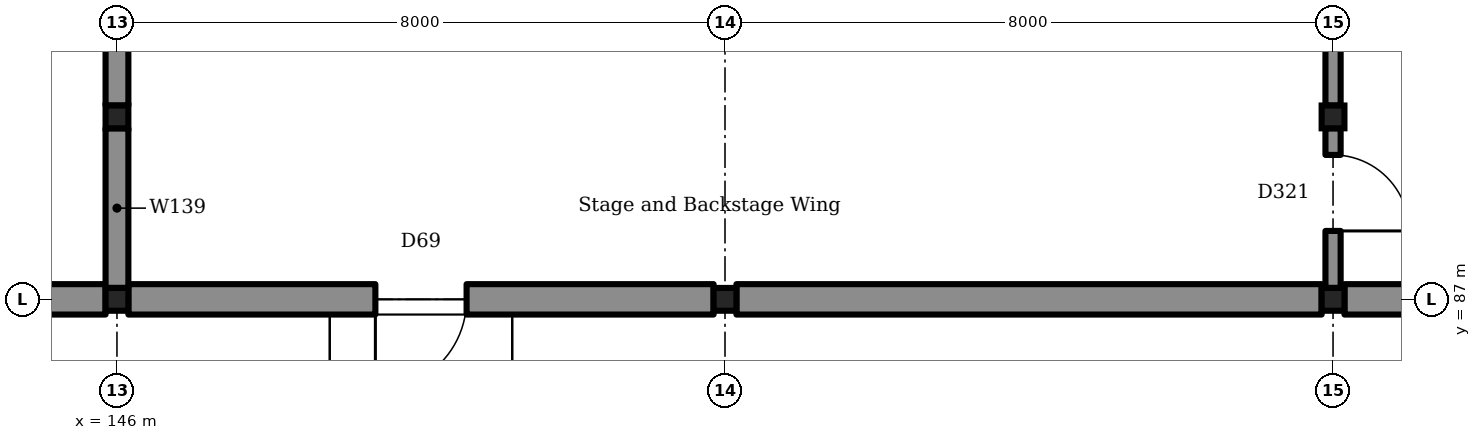
"""IFC4 building model, lengths in metres.
Left out: names, types, materials, properties, quantities, classifications, styles, units other than length and angle.
Written with IfcOpenShell. Run it as: python <this file> out.ifc"""

import sys

from ifc_helpers import new_model, si_unit, direction, frame, frame_2d, origin, origin_2d, place, context, subcontext, project, spatial, rectangle, i_section, extrude, element, fill, save


model = new_model("IFC4")
c1 = context("Model", 3, precision=1e-05, world=origin(), true_north=direction((0.0, 1.0)))
c2 = subcontext(c1, "Body", "Model", "MODEL_VIEW")
j1 = project(units=[si_unit("LENGTHUNIT", "METRE"), si_unit("PLANEANGLEUNIT", "RADIAN")], contexts=[c1])
p1 = place(None, origin())
s1 = spatial("IfcSite", under=j1, at=p1, CompositionType="ELEMENT")
p2 = place(p1, origin())
s2 = spatial("IfcBuilding", under=s1, at=p2, CompositionType="ELEMENT")
p3 = place(p2, origin())
s3 = spatial("IfcBuildingStorey", under=s2, at=p3, CompositionType="ELEMENT", Elevation=0.0)
for number, where, z_axis, x_axis in (
    (1, (146.0, 87.0, 0.0), (0.0, 0.0, 1.0), (1.0, 0.0, 0.0)),
    (2, (146.0, 89.4, 0.0), (0.0, 0.0, 1.0), (1.0, 0.0, 0.0)),
    (3, (162.0, 87.0, 0.0), (0.0, 0.0, 1.0), (1.0, 0.0, 0.0)),
    (4, (162.0, 89.4, 0.0), (0.0, 0.0, 1.0), (1.0, 0.0, 0.0)),
    (5, (154.0, 87.0, 0.0), (0.0, 0.0, 1.0), (1.0, 0.0, 0.0)),
):
    element("IfcColumn", number, at=place(p3, frame(where, z_axis=z_axis, x_axis=x_axis)), inside=s3, PredefinedType="COLUMN", context=c2, shape_type="SweptSolid", body=[
        extrude(i_section(OverallWidth=0.3, OverallDepth=0.3, WebThickness=0.011, FlangeThickness=0.019, FilletRadius=0.027, at=origin_2d()), origin(), (0.0, 0.0, 1.0), 5.4),
    ])
p4 = place(p3, frame((138.09, 87.0, 0.0), z_axis=(0.0, 0.0, 1.0), x_axis=(1.0, 0.0, 0.0)))
e6 = element("IfcWall", 6, at=p4, inside=s3, PredefinedType="SOLIDWALL", context=c2, shape_type="SweptSolid", body=[
    extrude(rectangle(XDim=7.76, YDim=0.4, at=frame_2d((3.88, 0.0))), origin(), (0.0, 0.0, 1.0), 5.15),
])
p5 = place(p4, frame((3.41, 0.0, 0.0)))
e7 = element("IfcOpeningElement", 7, at=p5, cuts=e6, PredefinedType="OPENING", context=c2, shape_type="SweptSolid", body=[
    extrude(rectangle(XDim=1.0, YDim=2.1, at=frame_2d((0.5, 1.05))), frame((0.0, 0.21, 0.0), z_axis=(0.0, -1.0, 0.0), x_axis=(1.0, 0.0, 0.0)), (0.0, 0.0, 1.0), 0.42),
])
p6 = place(p3, frame((146.15, 87.0, 0.0), z_axis=(0.0, 0.0, 1.0), x_axis=(1.0, 0.0, 0.0)))
e8 = element("IfcWall", 8, at=p6, inside=s3, PredefinedType="SOLIDWALL", context=c2, shape_type="SweptSolid", body=[
    extrude(rectangle(XDim=7.7, YDim=0.4, at=frame_2d((3.85, 0.0))), origin(), (0.0, 0.0, 1.0), 5.15),
])
p7 = place(p6, frame((3.25, 0.0, 0.0)))
e9 = element("IfcOpeningElement", 9, at=p7, cuts=e8, PredefinedType="OPENING", context=c2, shape_type="SweptSolid", body=[
    extrude(rectangle(XDim=1.2, YDim=2.1, at=frame_2d((0.6, 1.05))), frame((0.0, 0.21, 0.0), z_axis=(0.0, -1.0, 0.0), x_axis=(1.0, 0.0, 0.0)), (0.0, 0.0, 1.0), 0.42),
])
p8 = place(p3, frame((154.15, 87.0, 0.0), z_axis=(0.0, 0.0, 1.0), x_axis=(1.0, 0.0, 0.0)))
e10 = element("IfcWall", 10, at=p8, inside=s3, PredefinedType="SOLIDWALL", context=c2, shape_type="SweptSolid", body=[
    extrude(rectangle(XDim=7.7, YDim=0.4, at=frame_2d((3.85, 0.0))), origin(), (0.0, 0.0, 1.0), 5.15),
])
p9 = place(p3, frame((162.15, 87.0, 0.0), z_axis=(0.0, 0.0, 1.0), x_axis=(1.0, 0.0, 0.0)))
e11 = element("IfcWall", 11, at=p9, inside=s3, PredefinedType="SOLIDWALL", context=c2, shape_type="SweptSolid", body=[
    extrude(rectangle(XDim=7.7, YDim=0.4, at=frame_2d((3.85, 0.0))), origin(), (0.0, 0.0, 1.0), 5.15),
])
p10 = place(p9, frame((1.65, 0.0, 0.0)))
e12 = element("IfcOpeningElement", 12, at=p10, cuts=e11, PredefinedType="OPENING", context=c2, shape_type="SweptSolid", body=[
    extrude(rectangle(XDim=1.0, YDim=2.1, at=frame_2d((0.5, 1.05))), frame((0.0, 0.21, 0.0), z_axis=(0.0, -1.0, 0.0), x_axis=(1.0, 0.0, 0.0)), (0.0, 0.0, 1.0), 0.42),
])
p11 = place(p3, frame((146.0, 87.15, 0.0), z_axis=(0.0, 0.0, 1.0), x_axis=(0.0, 1.0, 0.0)))
e13 = element("IfcWall", 13, at=p11, inside=s3, PredefinedType="SOLIDWALL", context=c2, shape_type="SweptSolid", body=[
    extrude(rectangle(XDim=2.1, YDim=0.3, at=frame_2d((1.05, 0.0))), origin(), (0.0, 0.0, 1.0), 5.15),
])
p12 = place(p3, frame((146.0, 89.55, 0.0), z_axis=(0.0, 0.0, 1.0), x_axis=(0.0, 1.0, 0.0)))
e14 = element("IfcWall", 14, at=p12, inside=s3, PredefinedType="SOLIDWALL", context=c2, shape_type="SweptSolid", body=[
    extrude(rectangle(XDim=6.3, YDim=0.3, at=frame_2d((3.15, 0.0))), origin(), (0.0, 0.0, 1.0), 5.15),
])
p13 = place(p3, frame((162.0, 87.15, 0.0), z_axis=(0.0, 0.0, 1.0), x_axis=(0.0, 1.0, 0.0)))
e15 = element("IfcWall", 15, at=p13, inside=s3, PredefinedType="SOLIDWALL", context=c2, shape_type="SweptSolid", body=[
    extrude(rectangle(XDim=2.1, YDim=0.2, at=frame_2d((1.05, 0.0))), origin(), (0.0, 0.0, 1.0), 5.15),
])
p14 = place(p13, frame((0.75, 0.0, 0.0)))
e16 = element("IfcOpeningElement", 16, at=p14, cuts=e15, PredefinedType="OPENING", context=c2, shape_type="SweptSolid", body=[
    extrude(rectangle(XDim=1.0, YDim=2.1, at=frame_2d((0.5, 1.05))), frame((0.0, 0.11, 0.0), z_axis=(0.0, -1.0, 0.0), x_axis=(1.0, 0.0, 0.0)), (0.0, 0.0, 1.0), 0.22),
])
p15 = place(p3, frame((162.0, 89.55, 0.0), z_axis=(0.0, 0.0, 1.0), x_axis=(0.0, 1.0, 0.0)))
e17 = element("IfcWall", 17, at=p15, inside=s3, PredefinedType="SOLIDWALL", context=c2, shape_type="SweptSolid", body=[
    extrude(rectangle(XDim=6.3, YDim=0.2, at=frame_2d((3.15, 0.0))), origin(), (0.0, 0.0, 1.0), 5.15),
])
p16 = place(p7, frame((1.2, 0.0, 0.0), z_axis=(0.0, 0.0, 1.0), x_axis=(-1.0, 0.0, 0.0)))
e18 = element("IfcDoor", 18, at=p16, inside=s3, OperationType="SINGLE_SWING_LEFT", PredefinedType="DOOR", context=c2, shape_type="SweptSolid", body=[
    extrude(rectangle(XDim=1.2, YDim=2.1, at=frame_2d((0.6, 1.05))), frame((0.0, 0.025, 0.0), z_axis=(0.0, -1.0, 0.0), x_axis=(1.0, 0.0, 0.0)), (0.0, 0.0, 1.0), 0.05),
])
fill(e9, e18)
p17 = place(p14, frame((1.0, 0.0, 0.0), z_axis=(0.0, 0.0, 1.0), x_axis=(-1.0, 0.0, 0.0)))
e19 = element("IfcDoor", 19, at=p17, inside=s3, OperationType="SINGLE_SWING_LEFT", PredefinedType="DOOR", context=c2, shape_type="SweptSolid", body=[
    extrude(rectangle(XDim=1.0, YDim=2.1, at=frame_2d((0.5, 1.05))), frame((0.0, 0.025, 0.0), z_axis=(0.0, -1.0, 0.0), x_axis=(1.0, 0.0, 0.0)), (0.0, 0.0, 1.0), 0.05),
])
fill(e16, e19)
save(model, sys.argv[1])
